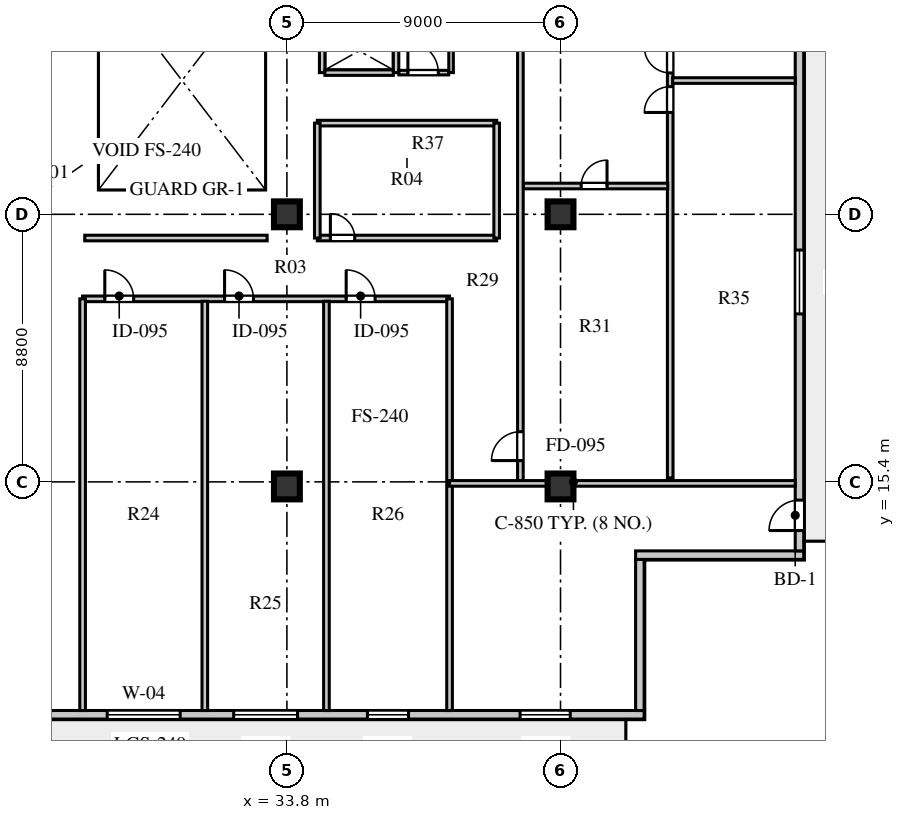
"""IFC4 building model, lengths in metres.
Left out: names, types, materials, properties, quantities, classifications, styles, units other than length and angle.
Written with IfcOpenShell. Run it as: python <this file> out.ifc"""

import sys

from ifc_helpers import new_model, si_unit, direction, frame, frame_2d, origin, origin_2d, place, context, subcontext, project, spatial, rectangle, extrude, element, fill, save


model = new_model("IFC4")
c1 = context("Model", 3, precision=1e-05, world=origin(), true_north=direction((0.0, 1.0)))
c2 = subcontext(c1, "Body", "Model", "MODEL_VIEW")
j1 = project(units=[si_unit("LENGTHUNIT", "METRE"), si_unit("PLANEANGLEUNIT", "RADIAN")], contexts=[c1])
p1 = place(None, origin())
s1 = spatial("IfcSite", under=j1, at=p1, CompositionType="ELEMENT")
p2 = place(p1, origin())
s2 = spatial("IfcBuilding", under=s1, at=p2, CompositionType="ELEMENT")
p3 = place(p2, frame((0.0, 0.0, 260.9)))
s3 = spatial("IfcBuildingStorey", under=s2, at=p3, CompositionType="ELEMENT", Elevation=260.9)
for number, where, z_axis, x_axis in (
    (1, (33.8, 15.25, 0.0), (0.0, 0.0, 1.0), (1.0, 0.0, 0.0)),
    (2, (33.8, 24.2, 0.0), (0.0, 0.0, 1.0), (1.0, 0.0, 0.0)),
    (3, (42.8, 15.25, 0.0), (0.0, 0.0, 1.0), (1.0, 0.0, 0.0)),
    (4, (42.8, 24.2, 0.0), (0.0, 0.0, 1.0), (1.0, 0.0, 0.0)),
):
    element("IfcColumn", number, at=place(p3, frame(where, z_axis=z_axis, x_axis=x_axis)), inside=s3, PredefinedType="COLUMN", context=c2, shape_type="SweptSolid", body=[
        extrude(rectangle(XDim=0.85, YDim=0.85, at=origin_2d()), origin(), (0.0, 0.0, 1.0), 3.66),
    ])
p4 = place(p3, frame((13.05, 7.74, 0.0), z_axis=(0.0, 0.0, 1.0), x_axis=(1.0, 0.0, 0.0)))
e5 = element("IfcWall", 5, at=p4, inside=s3, PredefinedType="STANDARD", context=c2, shape_type="SweptSolid", body=[
    extrude(rectangle(XDim=32.5, YDim=0.28, at=frame_2d((16.25, 0.0))), origin(), (0.0, 0.0, 1.0), 3.66),
])
p5 = place(p4, frame((0.95, 0.0, 0.0)))
e6 = element("IfcOpeningElement", 6, at=p5, cuts=e5, PredefinedType="OPENING", context=c2, shape_type="SweptSolid", body=[
    extrude(rectangle(XDim=1.0, YDim=2.05, at=frame_2d((0.5, 1.025))), frame((0.0, 0.15, 0.0), z_axis=(0.0, -1.0, 0.0), x_axis=(1.0, 0.0, 0.0)), (0.0, 0.0, 1.0), 0.3),
])
p6 = place(p4, frame((3.31, 0.0, 0.8)))
e7 = element("IfcOpeningElement", 7, at=p6, cuts=e5, PredefinedType="OPENING", context=c2, shape_type="SweptSolid", body=[
    extrude(rectangle(XDim=1.5, YDim=2.0, at=frame_2d((0.75, 1.0))), frame((0.0, 0.15, 0.0), z_axis=(0.0, -1.0, 0.0), x_axis=(1.0, 0.0, 0.0)), (0.0, 0.0, 1.0), 0.3),
])
p7 = place(p4, frame((8.595, 0.0, 0.8)))
e8 = element("IfcOpeningElement", 8, at=p7, cuts=e5, PredefinedType="OPENING", context=c2, shape_type="SweptSolid", body=[
    extrude(rectangle(XDim=1.2, YDim=1.75, at=frame_2d((0.6, 0.875))), frame((0.0, 0.15, 0.0), z_axis=(0.0, -1.0, 0.0), x_axis=(1.0, 0.0, 0.0)), (0.0, 0.0, 1.0), 0.3),
])
p8 = place(p4, frame((14.84, 0.0, 0.8)))
e9 = element("IfcOpeningElement", 9, at=p8, cuts=e5, PredefinedType="OPENING", context=c2, shape_type="SweptSolid", body=[
    extrude(rectangle(XDim=2.4, YDim=2.05, at=frame_2d((1.2, 1.025))), frame((0.0, 0.15, 0.0), z_axis=(0.0, -1.0, 0.0), x_axis=(1.0, 0.0, 0.0)), (0.0, 0.0, 1.0), 0.3),
])
p9 = place(p4, frame((19.0, 0.0, 0.8)))
e10 = element("IfcOpeningElement", 10, at=p9, cuts=e5, PredefinedType="OPENING", context=c2, shape_type="SweptSolid", body=[
    extrude(rectangle(XDim=2.1, YDim=1.95, at=frame_2d((1.05, 0.975))), frame((0.0, 0.15, 0.0), z_axis=(0.0, -1.0, 0.0), x_axis=(1.0, 0.0, 0.0)), (0.0, 0.0, 1.0), 0.3),
])
p10 = place(p4, frame((23.4, 0.0, 0.8)))
e11 = element("IfcOpeningElement", 11, at=p10, cuts=e5, PredefinedType="OPENING", context=c2, shape_type="SweptSolid", body=[
    extrude(rectangle(XDim=1.35, YDim=1.9, at=frame_2d((0.675, 0.95))), frame((0.0, 0.15, 0.0), z_axis=(0.0, -1.0, 0.0), x_axis=(1.0, 0.0, 0.0)), (0.0, 0.0, 1.0), 0.3),
])
p11 = place(p4, frame((28.42, 0.0, 0.8)))
e12 = element("IfcOpeningElement", 12, at=p11, cuts=e5, PredefinedType="OPENING", context=c2, shape_type="SweptSolid", body=[
    extrude(rectangle(XDim=1.65, YDim=1.95, at=frame_2d((0.825, 0.975))), frame((0.0, 0.15, 0.0), z_axis=(0.0, -1.0, 0.0), x_axis=(1.0, 0.0, 0.0)), (0.0, 0.0, 1.0), 0.3),
])
p12 = place(p3, frame((45.41, 7.88, 0.0), z_axis=(0.0, 0.0, 1.0), x_axis=(0.0, 1.0, 0.0)))
e13 = element("IfcWall", 13, at=p12, inside=s3, PredefinedType="STANDARD", context=c2, shape_type="SweptSolid", body=[
    extrude(rectangle(XDim=4.97, YDim=0.28, at=frame_2d((2.485, 0.0))), origin(), (0.0, 0.0, 1.0), 3.66),
])
p13 = place(p3, frame((45.27, 12.99, 0.0), z_axis=(0.0, 0.0, 1.0), x_axis=(1.0, 0.0, 0.0)))
e14 = element("IfcWall", 14, at=p13, inside=s3, PredefinedType="STANDARD", context=c2, shape_type="SweptSolid", body=[
    extrude(rectangle(XDim=5.53, YDim=0.28, at=frame_2d((2.765, 0.0))), origin(), (0.0, 0.0, 1.0), 3.66),
])
p14 = place(p3, frame((50.66, 13.13, 0.0), z_axis=(0.0, 0.0, 1.0), x_axis=(0.0, 1.0, 0.0)))
e15 = element("IfcWall", 15, at=p14, inside=s3, PredefinedType="STANDARD", context=c2, shape_type="SweptSolid", body=[
    extrude(rectangle(XDim=30.94, YDim=0.28, at=frame_2d((15.47, 0.0))), origin(), (0.0, 0.0, 1.0), 3.66),
])
p15 = place(p14, frame((0.67, 0.0, 0.0)))
e16 = element("IfcOpeningElement", 16, at=p15, cuts=e15, PredefinedType="OPENING", context=c2, shape_type="SweptSolid", body=[
    extrude(rectangle(XDim=1.0, YDim=2.05, at=frame_2d((0.5, 1.025))), frame((0.0, 0.15, 0.0), z_axis=(0.0, -1.0, 0.0), x_axis=(1.0, 0.0, 0.0)), (0.0, 0.0, 1.0), 0.3),
])
p16 = place(p14, frame((7.795, 0.0, 0.8)))
e17 = element("IfcOpeningElement", 17, at=p16, cuts=e15, PredefinedType="OPENING", context=c2, shape_type="SweptSolid", body=[
    extrude(rectangle(XDim=2.1, YDim=1.95, at=frame_2d((1.05, 0.975))), frame((0.0, 0.15, 0.0), z_axis=(0.0, -1.0, 0.0), x_axis=(1.0, 0.0, 0.0)), (0.0, 0.0, 1.0), 0.3),
])
p17 = place(p14, frame((21.42, 0.0, 0.8)))
e18 = element("IfcOpeningElement", 18, at=p17, cuts=e15, PredefinedType="OPENING", context=c2, shape_type="SweptSolid", body=[
    extrude(rectangle(XDim=1.35, YDim=1.9, at=frame_2d((0.675, 0.95))), frame((0.0, 0.15, 0.0), z_axis=(0.0, -1.0, 0.0), x_axis=(1.0, 0.0, 0.0)), (0.0, 0.0, 1.0), 0.3),
])
p18 = place(p14, frame((29.175, 0.0, 0.8)))
e19 = element("IfcOpeningElement", 19, at=p18, cuts=e15, PredefinedType="OPENING", context=c2, shape_type="SweptSolid", body=[
    extrude(rectangle(XDim=1.2, YDim=1.75, at=frame_2d((0.6, 0.875))), frame((0.0, 0.15, 0.0), z_axis=(0.0, -1.0, 0.0), x_axis=(1.0, 0.0, 0.0)), (0.0, 0.0, 1.0), 0.3),
])
p19 = place(p3, frame((34.96, 28.86, 0.0), z_axis=(0.0, 0.0, 1.0), x_axis=(0.0, 1.0, 0.0)))
e20 = element("IfcWall", 20, at=p19, inside=s3, PredefinedType="SOLIDWALL", context=c2, shape_type="SweptSolid", body=[
    extrude(rectangle(XDim=4.22, YDim=0.18, at=frame_2d((2.11, 0.0))), origin(), (0.0, 0.0, 1.0), 3.66),
])
p20 = place(p3, frame((37.39, 28.86, 0.0), z_axis=(0.0, 0.0, 1.0), x_axis=(0.0, 1.0, 0.0)))
e21 = element("IfcWall", 21, at=p20, inside=s3, PredefinedType="SOLIDWALL", context=c2, shape_type="SweptSolid", body=[
    extrude(rectangle(XDim=4.22, YDim=0.18, at=frame_2d((2.11, 0.0))), origin(), (0.0, 0.0, 1.0), 3.66),
])
p21 = place(p20, frame((2.1, 0.0, 0.0)))
e22 = element("IfcOpeningElement", 22, at=p21, cuts=e21, PredefinedType="OPENING", context=c2, shape_type="SweptSolid", body=[
    extrude(rectangle(XDim=1.2, YDim=2.12, at=frame_2d((0.6, 1.06))), frame((0.0, 0.1, 0.0), z_axis=(0.0, -1.0, 0.0), x_axis=(1.0, 0.0, 0.0)), (0.0, 0.0, 1.0), 0.2),
])
p22 = place(p3, frame((35.05, 28.86, 0.0), z_axis=(0.0, 0.0, 1.0), x_axis=(1.0, 0.0, 0.0)))
e23 = element("IfcWall", 23, at=p22, inside=s3, PredefinedType="SOLIDWALL", context=c2, shape_type="SweptSolid", body=[
    extrude(rectangle(XDim=2.25, YDim=0.18, at=frame_2d((1.125, 0.0))), origin(), (0.0, 0.0, 1.0), 3.66),
])
p23 = place(p3, frame((39.2, 28.86, 0.0), z_axis=(0.0, 0.0, 1.0), x_axis=(0.0, 1.0, 0.0)))
e24 = element("IfcWall", 24, at=p23, inside=s3, PredefinedType="PARTITIONING", context=c2, shape_type="SweptSolid", body=[
    extrude(rectangle(XDim=4.22, YDim=0.15, at=frame_2d((2.11, 0.0))), origin(), (0.0, 0.0, 1.0), 3.66),
])
p24 = place(p3, frame((37.48, 28.86, 0.0), z_axis=(0.0, 0.0, 1.0), x_axis=(1.0, 0.0, 0.0)))
e25 = element("IfcWall", 25, at=p24, inside=s3, PredefinedType="PARTITIONING", context=c2, shape_type="SweptSolid", body=[
    extrude(rectangle(XDim=1.64, YDim=0.15, at=frame_2d((0.82, 0.0))), origin(), (0.0, 0.0, 1.0), 3.66),
])
p25 = place(p24, frame((0.3, 0.0, 0.0)))
e26 = element("IfcOpeningElement", 26, at=p25, cuts=e25, PredefinedType="OPENING", context=c2, shape_type="SweptSolid", body=[
    extrude(rectangle(XDim=1.0, YDim=2.1, at=frame_2d((0.5, 1.05))), frame((0.0, 0.085, 0.0), z_axis=(0.0, -1.0, 0.0), x_axis=(1.0, 0.0, 0.0)), (0.0, 0.0, 1.0), 0.17),
])
p26 = place(p3, frame((27.08, 21.42, 0.0), z_axis=(0.0, 0.0, 1.0), x_axis=(1.0, 0.0, 0.0)))
e27 = element("IfcWall", 27, at=p26, inside=s3, PredefinedType="SOLIDWALL", context=c2, shape_type="SweptSolid", body=[
    extrude(rectangle(XDim=12.07, YDim=0.185, at=frame_2d((6.035, 0.0))), origin(), (0.0, 0.0, 1.0), 3.31),
])
p27 = place(p26, frame((0.73, 0.0, 0.0)))
e28 = element("IfcOpeningElement", 28, at=p27, cuts=e27, PredefinedType="OPENING", context=c2, shape_type="SweptSolid", body=[
    extrude(rectangle(XDim=0.95, YDim=2.08, at=frame_2d((0.475, 1.04))), frame((0.0, 0.103, 0.0), z_axis=(0.0, -1.0, 0.0), x_axis=(1.0, 0.0, 0.0)), (0.0, 0.0, 1.0), 0.205),
])
p28 = place(p26, frame((4.67, 0.0, 0.0)))
e29 = element("IfcOpeningElement", 29, at=p28, cuts=e27, PredefinedType="OPENING", context=c2, shape_type="SweptSolid", body=[
    extrude(rectangle(XDim=0.95, YDim=2.08, at=frame_2d((0.475, 1.04))), frame((0.0, 0.103, 0.0), z_axis=(0.0, -1.0, 0.0), x_axis=(1.0, 0.0, 0.0)), (0.0, 0.0, 1.0), 0.205),
])
p29 = place(p26, frame((8.67, 0.0, 0.0)))
e30 = element("IfcOpeningElement", 30, at=p29, cuts=e27, PredefinedType="OPENING", context=c2, shape_type="SweptSolid", body=[
    extrude(rectangle(XDim=0.95, YDim=2.08, at=frame_2d((0.475, 1.04))), frame((0.0, 0.103, 0.0), z_axis=(0.0, -1.0, 0.0), x_axis=(1.0, 0.0, 0.0)), (0.0, 0.0, 1.0), 0.205),
])
p30 = place(p3, frame((27.08, 7.88, 0.0), z_axis=(0.0, 0.0, 1.0), x_axis=(0.0, 1.0, 0.0)))
e31 = element("IfcWall", 31, at=p30, inside=s3, PredefinedType="SOLIDWALL", context=c2, shape_type="SweptSolid", body=[
    extrude(rectangle(XDim=13.54, YDim=0.185, at=frame_2d((6.77, 0.0))), origin(), (0.0, 0.0, 1.0), 3.66),
])
p31 = place(p3, frame((27.15, 23.42, 0.0), z_axis=(0.0, 0.0, 1.0), x_axis=(1.0, 0.0, 0.0)))
e32 = element("IfcWall", 32, at=p31, inside=s3, PredefinedType="SOLIDWALL", context=c2, shape_type="SweptSolid", body=[
    extrude(rectangle(XDim=6.0, YDim=0.185, at=frame_2d((3.0, 0.0))), origin(), (0.0, 0.0, 1.0), 3.66),
])
p32 = place(p3, frame((39.15, 7.88, 0.0), z_axis=(0.0, 0.0, 1.0), x_axis=(0.0, 1.0, 0.0)))
e33 = element("IfcWall", 33, at=p32, inside=s3, PredefinedType="SOLIDWALL", context=c2, shape_type="SweptSolid", body=[
    extrude(rectangle(XDim=13.54, YDim=0.185, at=frame_2d((6.77, 0.0))), origin(), (0.0, 0.0, 1.0), 3.66),
])
for number, where, z_axis, x_axis in (
    (34, (31.1, 7.88, 0.0), (0.0, 0.0, 1.0), (0.0, 1.0, 0.0)),
    (35, (35.1, 7.88, 0.0), (0.0, 0.0, 1.0), (0.0, 1.0, 0.0)),
):
    element("IfcWall", number, at=place(p3, frame(where, z_axis=z_axis, x_axis=x_axis)), inside=s3, PredefinedType="SOLIDWALL", context=c2, shape_type="SweptSolid", body=[
        extrude(rectangle(XDim=13.46, YDim=0.185, at=frame_2d((6.73, 0.0))), origin(), (0.0, 0.0, 1.0), 3.66),
    ])
p33 = place(p3, frame((41.48, 15.35, 0.0), z_axis=(0.0, 0.0, 1.0), x_axis=(0.0, 1.0, 0.0)))
e36 = element("IfcWall", 36, at=p33, inside=s3, PredefinedType="SOLIDWALL", context=c2, shape_type="SweptSolid", body=[
    extrude(rectangle(XDim=26.5, YDim=0.185, at=frame_2d((13.25, 0.0))), origin(), (0.0, 0.0, 1.0), 3.66),
])
p34 = place(p33, frame((0.75, 0.0, 0.0)))
e37 = element("IfcOpeningElement", 37, at=p34, cuts=e36, PredefinedType="OPENING", context=c2, shape_type="SweptSolid", body=[
    extrude(rectangle(XDim=0.95, YDim=2.1, at=frame_2d((0.475, 1.05))), frame((0.0, 0.103, 0.0), z_axis=(0.0, -1.0, 0.0), x_axis=(1.0, 0.0, 0.0)), (0.0, 0.0, 1.0), 0.205),
])
p35 = place(p3, frame((39.15, 15.35, 0.0), z_axis=(0.0, 0.0, 1.0), x_axis=(1.0, 0.0, 0.0)))
e38 = element("IfcWall", 38, at=p35, inside=s3, PredefinedType="SOLIDWALL", context=c2, shape_type="SweptSolid", body=[
    extrude(rectangle(XDim=11.37, YDim=0.185, at=frame_2d((5.685, 0.0))), origin(), (0.0, 0.0, 1.0), 3.06),
])
p36 = place(p3, frame((46.408, 15.53, 0.0), z_axis=(0.0, 0.0, 1.0), x_axis=(0.0, 1.0, 0.0)))
e39 = element("IfcWall", 39, at=p36, inside=s3, PredefinedType="SOLIDWALL", context=c2, shape_type="SweptSolid", body=[
    extrude(rectangle(XDim=26.14, YDim=0.185, at=frame_2d((13.07, 0.0))), origin(), (0.0, 0.0, 1.0), 3.66),
])
p37 = place(p36, frame((12.02, 0.0, 0.0)))
e40 = element("IfcOpeningElement", 40, at=p37, cuts=e39, PredefinedType="OPENING", context=c2, shape_type="SweptSolid", body=[
    extrude(rectangle(XDim=0.85, YDim=2.08, at=frame_2d((0.425, 1.04))), frame((0.0, 0.103, 0.0), z_axis=(0.0, -1.0, 0.0), x_axis=(1.0, 0.0, 0.0)), (0.0, 0.0, 1.0), 0.205),
])
p38 = place(p36, frame((13.32, 0.0, 0.0)))
e41 = element("IfcOpeningElement", 41, at=p38, cuts=e39, PredefinedType="OPENING", context=c2, shape_type="SweptSolid", body=[
    extrude(rectangle(XDim=0.85, YDim=2.08, at=frame_2d((0.425, 1.04))), frame((0.0, 0.103, 0.0), z_axis=(0.0, -1.0, 0.0), x_axis=(1.0, 0.0, 0.0)), (0.0, 0.0, 1.0), 0.205),
])
p39 = place(p3, frame((41.58, 25.131, 0.0), z_axis=(0.0, 0.0, 1.0), x_axis=(1.0, 0.0, 0.0)))
e42 = element("IfcWall", 42, at=p39, inside=s3, PredefinedType="SOLIDWALL", context=c2, shape_type="SweptSolid", body=[
    extrude(rectangle(XDim=4.748, YDim=0.185, at=frame_2d((2.374, 0.0))), origin(), (0.0, 0.0, 1.0), 3.66),
])
p40 = place(p39, frame((1.9, 0.0, 0.0)))
e43 = element("IfcOpeningElement", 43, at=p40, cuts=e42, PredefinedType="OPENING", context=c2, shape_type="SweptSolid", body=[
    extrude(rectangle(XDim=0.85, YDim=2.08, at=frame_2d((0.425, 1.04))), frame((0.0, 0.103, 0.0), z_axis=(0.0, -1.0, 0.0), x_axis=(1.0, 0.0, 0.0)), (0.0, 0.0, 1.0), 0.205),
])
p41 = place(p3, frame((46.488, 28.6, 0.0), z_axis=(0.0, 0.0, 1.0), x_axis=(1.0, 0.0, 0.0)))
e44 = element("IfcWall", 44, at=p41, inside=s3, PredefinedType="SOLIDWALL", context=c2, shape_type="SweptSolid", body=[
    extrude(rectangle(XDim=4.032, YDim=0.185, at=frame_2d((2.016, 0.0))), origin(), (0.0, 0.0, 1.0), 3.66),
])
p42 = place(p3, frame((34.8, 23.42, 0.0), z_axis=(0.0, 0.0, 1.0), x_axis=(1.0, 0.0, 0.0)))
e45 = element("IfcWall", 45, at=p42, inside=s3, PredefinedType="SOLIDWALL", context=c2, shape_type="SweptSolid", body=[
    extrude(rectangle(XDim=5.9, YDim=0.185, at=frame_2d((2.95, 0.0))), origin(), (0.0, 0.0, 1.0), 3.66),
])
p43 = place(p42, frame((0.43, 0.0, 0.0)))
e46 = element("IfcOpeningElement", 46, at=p43, cuts=e45, PredefinedType="OPENING", context=c2, shape_type="SweptSolid", body=[
    extrude(rectangle(XDim=0.8, YDim=2.05, at=frame_2d((0.4, 1.025))), frame((0.0, 0.103, 0.0), z_axis=(0.0, -1.0, 0.0), x_axis=(1.0, 0.0, 0.0)), (0.0, 0.0, 1.0), 0.205),
])
p44 = place(p3, frame((34.8, 27.2, 0.0), z_axis=(0.0, 0.0, 1.0), x_axis=(1.0, 0.0, 0.0)))
e47 = element("IfcWall", 47, at=p44, inside=s3, PredefinedType="SOLIDWALL", context=c2, shape_type="SweptSolid", body=[
    extrude(rectangle(XDim=5.9, YDim=0.185, at=frame_2d((2.95, 0.0))), origin(), (0.0, 0.0, 1.0), 3.31),
])
for number, where, z_axis, x_axis in (
    (48, (34.8, 23.42, 0.0), (0.0, 0.0, 1.0), (0.0, 1.0, 0.0)),
    (49, (40.7, 23.42, 0.0), (0.0, 0.0, 1.0), (0.0, 1.0, 0.0)),
):
    element("IfcWall", number, at=place(p3, frame(where, z_axis=z_axis, x_axis=x_axis)), inside=s3, PredefinedType="SOLIDWALL", context=c2, shape_type="SweptSolid", body=[
        extrude(rectangle(XDim=3.78, YDim=0.185, at=frame_2d((1.89, 0.0))), origin(), (0.0, 0.0, 1.0), 3.66),
    ])
p45 = place(p8, origin())
e50 = element("IfcWindow", 50, at=p45, inside=s3, PartitioningType="SINGLE_PANEL", PredefinedType="WINDOW", context=c2, shape_type="SweptSolid", body=[
    extrude(rectangle(XDim=2.4, YDim=2.05, at=frame_2d((1.2, 1.025))), frame((0.0, 0.03, 0.0), z_axis=(0.0, -1.0, 0.0), x_axis=(1.0, 0.0, 0.0)), (0.0, 0.0, 1.0), 0.06),
])
fill(e9, e50)
p46 = place(p9, origin())
e51 = element("IfcWindow", 51, at=p46, inside=s3, PartitioningType="SINGLE_PANEL", PredefinedType="WINDOW", context=c2, shape_type="SweptSolid", body=[
    extrude(rectangle(XDim=2.1, YDim=1.95, at=frame_2d((1.05, 0.975))), frame((0.0, 0.03, 0.0), z_axis=(0.0, -1.0, 0.0), x_axis=(1.0, 0.0, 0.0)), (0.0, 0.0, 1.0), 0.06),
])
fill(e10, e51)
p47 = place(p10, origin())
e52 = element("IfcWindow", 52, at=p47, inside=s3, PartitioningType="SINGLE_PANEL", PredefinedType="WINDOW", context=c2, shape_type="SweptSolid", body=[
    extrude(rectangle(XDim=1.35, YDim=1.9, at=frame_2d((0.675, 0.95))), frame((0.0, 0.03, 0.0), z_axis=(0.0, -1.0, 0.0), x_axis=(1.0, 0.0, 0.0)), (0.0, 0.0, 1.0), 0.06),
])
fill(e11, e52)
p48 = place(p11, origin())
e53 = element("IfcWindow", 53, at=p48, inside=s3, PartitioningType="SINGLE_PANEL", PredefinedType="WINDOW", context=c2, shape_type="SweptSolid", body=[
    extrude(rectangle(XDim=1.65, YDim=1.95, at=frame_2d((0.825, 0.975))), frame((0.0, 0.03, 0.0), z_axis=(0.0, -1.0, 0.0), x_axis=(1.0, 0.0, 0.0)), (0.0, 0.0, 1.0), 0.06),
])
fill(e12, e53)
p49 = place(p15, frame((1.0, 0.0, 0.0), z_axis=(0.0, 0.0, 1.0), x_axis=(-1.0, 0.0, 0.0)))
e54 = element("IfcDoor", 54, at=p49, inside=s3, OperationType="SINGLE_SWING_RIGHT", PredefinedType="DOOR", context=c2, shape_type="SweptSolid", body=[
    extrude(rectangle(XDim=1.0, YDim=2.05, at=frame_2d((0.5, 1.025))), frame((0.0, 0.025, 0.0), z_axis=(0.0, -1.0, 0.0), x_axis=(1.0, 0.0, 0.0)), (0.0, 0.0, 1.0), 0.05),
])
fill(e16, e54)
p50 = place(p16, origin())
e55 = element("IfcWindow", 55, at=p50, inside=s3, PartitioningType="SINGLE_PANEL", PredefinedType="WINDOW", context=c2, shape_type="SweptSolid", body=[
    extrude(rectangle(XDim=2.1, YDim=1.95, at=frame_2d((1.05, 0.975))), frame((0.0, 0.03, 0.0), z_axis=(0.0, -1.0, 0.0), x_axis=(1.0, 0.0, 0.0)), (0.0, 0.0, 1.0), 0.06),
])
fill(e17, e55)
p51 = place(p25, origin())
e56 = element("IfcDoor", 56, at=p51, inside=s3, OperationType="SINGLE_SWING_LEFT", PredefinedType="DOOR", context=c2, shape_type="SweptSolid", body=[
    extrude(rectangle(XDim=1.0, YDim=2.1, at=frame_2d((0.5, 1.05))), frame((0.0, 0.025, 0.0), z_axis=(0.0, -1.0, 0.0), x_axis=(1.0, 0.0, 0.0)), (0.0, 0.0, 1.0), 0.05),
])
fill(e26, e56)
p52 = place(p27, frame((0.95, 0.0, 0.0), z_axis=(0.0, 0.0, 1.0), x_axis=(-1.0, 0.0, 0.0)))
e57 = element("IfcDoor", 57, at=p52, inside=s3, OperationType="SINGLE_SWING_RIGHT", PredefinedType="DOOR", context=c2, shape_type="SweptSolid", body=[
    extrude(rectangle(XDim=0.95, YDim=2.08, at=frame_2d((0.475, 1.04))), frame((0.0, 0.025, 0.0), z_axis=(0.0, -1.0, 0.0), x_axis=(1.0, 0.0, 0.0)), (0.0, 0.0, 1.0), 0.05),
])
fill(e28, e57)
p53 = place(p28, frame((0.95, 0.0, 0.0), z_axis=(0.0, 0.0, 1.0), x_axis=(-1.0, 0.0, 0.0)))
e58 = element("IfcDoor", 58, at=p53, inside=s3, OperationType="SINGLE_SWING_RIGHT", PredefinedType="DOOR", context=c2, shape_type="SweptSolid", body=[
    extrude(rectangle(XDim=0.95, YDim=2.08, at=frame_2d((0.475, 1.04))), frame((0.0, 0.025, 0.0), z_axis=(0.0, -1.0, 0.0), x_axis=(1.0, 0.0, 0.0)), (0.0, 0.0, 1.0), 0.05),
])
fill(e29, e58)
p54 = place(p29, frame((0.95, 0.0, 0.0), z_axis=(0.0, 0.0, 1.0), x_axis=(-1.0, 0.0, 0.0)))
e59 = element("IfcDoor", 59, at=p54, inside=s3, OperationType="SINGLE_SWING_RIGHT", PredefinedType="DOOR", context=c2, shape_type="SweptSolid", body=[
    extrude(rectangle(XDim=0.95, YDim=2.08, at=frame_2d((0.475, 1.04))), frame((0.0, 0.025, 0.0), z_axis=(0.0, -1.0, 0.0), x_axis=(1.0, 0.0, 0.0)), (0.0, 0.0, 1.0), 0.05),
])
fill(e30, e59)
p55 = place(p40, frame((0.85, 0.0, 0.0), z_axis=(0.0, 0.0, 1.0), x_axis=(-1.0, 0.0, 0.0)))
e60 = element("IfcDoor", 60, at=p55, inside=s3, OperationType="SINGLE_SWING_LEFT", PredefinedType="DOOR", context=c2, shape_type="SweptSolid", body=[
    extrude(rectangle(XDim=0.85, YDim=2.08, at=frame_2d((0.425, 1.04))), frame((0.0, 0.025, 0.0), z_axis=(0.0, -1.0, 0.0), x_axis=(1.0, 0.0, 0.0)), (0.0, 0.0, 1.0), 0.05),
])
fill(e43, e60)
p56 = place(p37, origin())
e61 = element("IfcDoor", 61, at=p56, inside=s3, OperationType="SINGLE_SWING_LEFT", PredefinedType="DOOR", context=c2, shape_type="SweptSolid", body=[
    extrude(rectangle(XDim=0.85, YDim=2.08, at=frame_2d((0.425, 1.04))), frame((0.0, 0.025, 0.0), z_axis=(0.0, -1.0, 0.0), x_axis=(1.0, 0.0, 0.0)), (0.0, 0.0, 1.0), 0.05),
])
fill(e40, e61)
p57 = place(p38, origin())
e62 = element("IfcDoor", 62, at=p57, inside=s3, OperationType="SINGLE_SWING_RIGHT", PredefinedType="DOOR", context=c2, shape_type="SweptSolid", body=[
    extrude(rectangle(XDim=0.85, YDim=2.08, at=frame_2d((0.425, 1.04))), frame((0.0, 0.025, 0.0), z_axis=(0.0, -1.0, 0.0), x_axis=(1.0, 0.0, 0.0)), (0.0, 0.0, 1.0), 0.05),
])
fill(e41, e62)
p58 = place(p34, origin())
e63 = element("IfcDoor", 63, at=p58, inside=s3, OperationType="SINGLE_SWING_LEFT", PredefinedType="DOOR", context=c2, shape_type="SweptSolid", body=[
    extrude(rectangle(XDim=0.95, YDim=2.1, at=frame_2d((0.475, 1.05))), frame((0.0, 0.025, 0.0), z_axis=(0.0, -1.0, 0.0), x_axis=(1.0, 0.0, 0.0)), (0.0, 0.0, 1.0), 0.05),
])
fill(e37, e63)
p59 = place(p43, origin())
e64 = element("IfcDoor", 64, at=p59, inside=s3, OperationType="SINGLE_SWING_LEFT", PredefinedType="DOOR", context=c2, shape_type="SweptSolid", body=[
    extrude(rectangle(XDim=0.8, YDim=2.05, at=frame_2d((0.4, 1.025))), frame((0.0, 0.025, 0.0), z_axis=(0.0, -1.0, 0.0), x_axis=(1.0, 0.0, 0.0)), (0.0, 0.0, 1.0), 0.05),
])
fill(e46, e64)
save(model, sys.argv[1])
